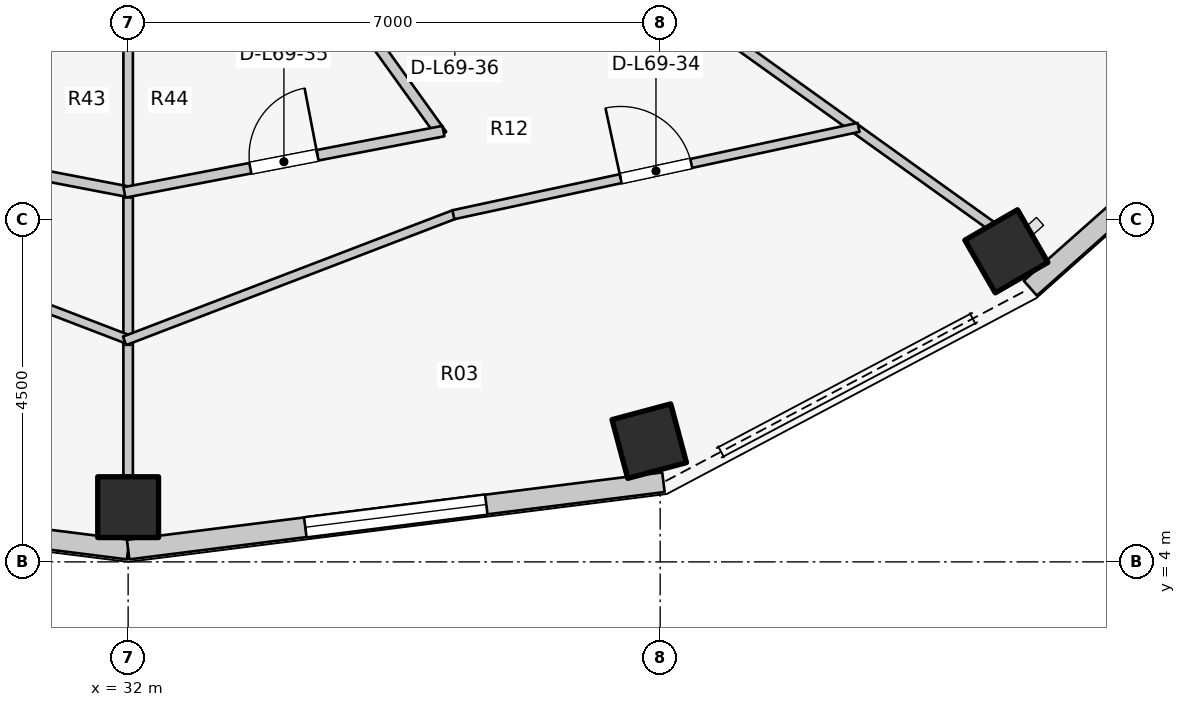
"""IFC4 building model, lengths in metres.
Left out: names, types, materials, properties, quantities, classifications, styles, units other than length and angle.
Written with IfcOpenShell. Run it as: python <this file> out.ifc"""

import sys

from ifc_helpers import new_model, si_unit, direction, frame, frame_2d, origin, origin_2d, place, context, subcontext, project, spatial, rectangle, extrude, element, fill, save


model = new_model("IFC4")
c1 = context("Model", 3, precision=1e-05, world=origin(), true_north=direction((0.0, 1.0)))
c2 = subcontext(c1, "Body", "Model", "MODEL_VIEW")
j1 = project(units=[si_unit("LENGTHUNIT", "METRE"), si_unit("PLANEANGLEUNIT", "RADIAN")], contexts=[c1])
p1 = place(None, origin())
s1 = spatial("IfcSite", under=j1, at=p1, CompositionType="ELEMENT")
p2 = place(p1, origin())
s2 = spatial("IfcBuilding", under=s1, at=p2, CompositionType="ELEMENT")
p3 = place(p2, frame((0.0, 0.0, 226.4)))
s3 = spatial("IfcBuildingStorey", under=s2, at=p3, CompositionType="ELEMENT", Elevation=226.4)
for number, where, z_axis, x_axis in (
    (1, (32.0, 4.72, 0.0), (0.0, 0.0, 1.0), (0.0, -1.0, 0.0)),
    (2, (38.856, 5.589, 0.0), (0.0, 0.0, 1.0), (0.259, -0.966, 0.0)),
    (3, (43.555, 8.086, 0.0), (0.0, 0.0, 1.0), (0.5, -0.866, 0.0)),
):
    element("IfcColumn", number, at=place(p3, frame(where, z_axis=z_axis, x_axis=x_axis)), inside=s3, PredefinedType="COLUMN", context=c2, shape_type="SweptSolid", body=[
        extrude(rectangle(XDim=0.8, YDim=0.8, at=origin_2d()), origin(), (0.0, 0.0, 1.0), 3.1),
    ])
p4 = place(p3, frame((24.957, 5.048, 0.0), z_axis=(0.0, 0.0, 1.0), x_axis=(0.992180211307, -0.124813574142, 0.0)))
e4 = element("IfcWall", 4, at=p4, inside=s3, PredefinedType="STANDARD", context=c2, shape_type="SweptSolid", body=[
    extrude(rectangle(XDim=7.098, YDim=0.26, at=frame_2d((3.549, 0.0))), origin(), (0.0, 0.0, 1.0), 2.85),
])
p5 = place(p4, frame((2.799, 0.0, 0.75)))
e5 = element("IfcOpeningElement", 5, at=p5, cuts=e4, PredefinedType="OPENING", context=c2, shape_type="SweptSolid", body=[
    extrude(rectangle(XDim=1.5, YDim=1.6, at=frame_2d((0.75, 0.8))), frame((0.0, 0.14, 0.0), z_axis=(0.0, -1.0, 0.0), x_axis=(1.0, 0.0, 0.0)), (0.0, 0.0, 1.0), 0.28),
])
p6 = place(p3, frame((32.0, 4.162, 0.0), z_axis=(0.0, 0.0, 1.0), x_axis=(0.992180211307, 0.124813574142, 0.0)))
e6 = element("IfcWall", 6, at=p6, inside=s3, PredefinedType="STANDARD", context=c2, shape_type="SweptSolid", body=[
    extrude(rectangle(XDim=7.098, YDim=0.26, at=frame_2d((3.549, 0.0))), origin(), (0.0, 0.0, 1.0), 2.85),
])
p7 = place(p6, frame((2.349, 0.0, 0.75)))
e7 = element("IfcOpeningElement", 7, at=p7, cuts=e6, PredefinedType="OPENING", context=c2, shape_type="SweptSolid", body=[
    extrude(rectangle(XDim=2.4, YDim=1.7, at=frame_2d((1.2, 0.85))), frame((0.0, 0.14, 0.0), z_axis=(0.0, -1.0, 0.0), x_axis=(1.0, 0.0, 0.0)), (0.0, 0.0, 1.0), 0.28),
])
p8 = place(p3, frame((43.87, 7.601, 0.0), z_axis=(0.0, 0.0, 1.0), x_axis=(0.748165854006, 0.663511759428, 0.0)))
e8 = element("IfcWall", 8, at=p8, inside=s3, PredefinedType="STANDARD", context=c2, shape_type="SweptSolid", body=[
    extrude(rectangle(XDim=4.929, YDim=0.26, at=frame_2d((2.464, 0.0))), origin(), (0.0, 0.0, 1.0), 2.85),
])
p9 = place(p3, frame((32.0, 10.815, 0.0), z_axis=(0.0, 0.0, 1.0), x_axis=(0.0, -1.0, 0.0)))
e9 = element("IfcWall", 9, at=p9, inside=s3, PredefinedType="PARTITIONING", context=c2, shape_type="SweptSolid", body=[
    extrude(rectangle(XDim=5.715, YDim=0.125, at=frame_2d((2.857, 0.0))), origin(), (0.0, 0.0, 1.0), 2.376),
])
p10 = place(p3, frame((37.71, 12.463, 0.0), z_axis=(0.0, 0.0, 1.0), x_axis=(0.813163816543, -0.582034885093, 0.0)))
e10 = element("IfcWall", 10, at=p10, inside=s3, PredefinedType="PARTITIONING", context=c2, shape_type="SweptSolid", body=[
    extrude(rectangle(XDim=6.955, YDim=0.125, at=frame_2d((3.477, 0.0))), origin(), (0.0, 0.0, 1.0), 2.376),
])
p11 = place(p3, frame((27.702, 8.573, 0.0), z_axis=(0.0, 0.0, 1.0), x_axis=(0.933766866443, -0.357881878744, 0.0)))
e11 = element("IfcWall", 11, at=p11, inside=s3, PredefinedType="MOVABLE", context=c2, shape_type="SweptSolid", body=[
    extrude(rectangle(XDim=4.653, YDim=0.12, at=frame_2d((2.327, 0.0))), origin(), (0.0, 0.0, 1.0), 2.376),
])
p12 = place(p11, frame((1.852, 0.0, 0.0)))
e12 = element("IfcOpeningElement", 12, at=p12, cuts=e11, PredefinedType="OPENING", context=c2, shape_type="SweptSolid", body=[
    extrude(rectangle(XDim=0.95, YDim=2.1, at=frame_2d((0.475, 1.05))), frame((0.0, 0.07, 0.0), z_axis=(0.0, -1.0, 0.0), x_axis=(1.0, 0.0, 0.0)), (0.0, 0.0, 1.0), 0.14),
])
p13 = place(p3, frame((27.852, 9.668, 0.0), z_axis=(0.0, 0.0, 1.0), x_axis=(0.98198484664, -0.188959680803, 0.0)))
e13 = element("IfcWall", 13, at=p13, inside=s3, PredefinedType="PLUMBINGWALL", context=c2, shape_type="SweptSolid", body=[
    extrude(rectangle(XDim=4.274, YDim=0.14, at=frame_2d((2.137, 0.0))), origin(), (0.0, 0.0, 1.0), 2.376),
])
p14 = place(p13, frame((1.687, 0.0, 0.0)))
e14 = element("IfcOpeningElement", 14, at=p14, cuts=e13, PredefinedType="OPENING", context=c2, shape_type="SweptSolid", body=[
    extrude(rectangle(XDim=0.9, YDim=2.1, at=frame_2d((0.45, 1.05))), frame((0.0, 0.08, 0.0), z_axis=(0.0, -1.0, 0.0), x_axis=(1.0, 0.0, 0.0)), (0.0, 0.0, 1.0), 0.16),
])
p15 = place(p3, frame((31.953, 6.908, 0.0), z_axis=(0.0, 0.0, 1.0), x_axis=(0.933766866443, 0.357881878744, 0.0)))
e15 = element("IfcWall", 15, at=p15, inside=s3, PredefinedType="MOVABLE", context=c2, shape_type="SweptSolid", body=[
    extrude(rectangle(XDim=4.653, YDim=0.12, at=frame_2d((2.327, 0.0))), origin(), (0.0, 0.0, 1.0), 2.376),
])
p16 = place(p3, frame((36.279, 8.567, 0.0), z_axis=(0.0, 0.0, 1.0), x_axis=(0.977534972695, 0.210773283785, 0.0)))
e16 = element("IfcWall", 16, at=p16, inside=s3, PredefinedType="MOVABLE", context=c2, shape_type="SweptSolid", body=[
    extrude(rectangle(XDim=5.453, YDim=0.12, at=frame_2d((2.727, 0.0))), origin(), (0.0, 0.0, 1.0), 2.376),
])
p17 = place(p16, frame((2.252, 0.0, 0.0)))
e17 = element("IfcOpeningElement", 17, at=p17, cuts=e16, PredefinedType="OPENING", context=c2, shape_type="SweptSolid", body=[
    extrude(rectangle(XDim=0.95, YDim=2.1, at=frame_2d((0.475, 1.05))), frame((0.0, 0.07, 0.0), z_axis=(0.0, -1.0, 0.0), x_axis=(1.0, 0.0, 0.0)), (0.0, 0.0, 1.0), 0.14),
])
p18 = place(p3, frame((34.903, 11.324, 0.0), z_axis=(0.0, 0.0, 1.0), x_axis=(0.583259891741, -0.812285601673, 0.0)))
e18 = element("IfcWall", 18, at=p18, inside=s3, PredefinedType="PLUMBINGWALL", context=c2, shape_type="SweptSolid", body=[
    extrude(rectangle(XDim=2.1, YDim=0.14, at=frame_2d((1.05, 0.0))), origin(), (0.0, 0.0, 1.0), 2.385),
])
p19 = place(p3, frame((31.951, 8.861, 0.0), z_axis=(0.0, 0.0, 1.0), x_axis=(0.98198484664, 0.188959680803, 0.0)))
e19 = element("IfcWall", 19, at=p19, inside=s3, PredefinedType="PLUMBINGWALL", context=c2, shape_type="SweptSolid", body=[
    extrude(rectangle(XDim=4.274, YDim=0.14, at=frame_2d((2.137, 0.0))), origin(), (0.0, 0.0, 1.0), 2.376),
])
p20 = place(p19, frame((1.687, 0.0, 0.0)))
e20 = element("IfcOpeningElement", 20, at=p20, cuts=e19, PredefinedType="OPENING", context=c2, shape_type="SweptSolid", body=[
    extrude(rectangle(XDim=0.9, YDim=2.1, at=frame_2d((0.45, 1.05))), frame((0.0, 0.08, 0.0), z_axis=(0.0, -1.0, 0.0), x_axis=(1.0, 0.0, 0.0)), (0.0, 0.0, 1.0), 0.16),
])
p21 = place(p7, origin())
e21 = element("IfcWindow", 21, at=p21, inside=s3, PartitioningType="SINGLE_PANEL", PredefinedType="WINDOW", context=c2, shape_type="SweptSolid", body=[
    extrude(rectangle(XDim=2.4, YDim=1.7, at=frame_2d((1.2, 0.85))), frame((0.0, 0.03, 0.0), z_axis=(0.0, -1.0, 0.0), x_axis=(1.0, 0.0, 0.0)), (0.0, 0.0, 1.0), 0.06),
])
fill(e7, e21)
p22 = place(p17, origin())
e22 = element("IfcDoor", 22, at=p22, inside=s3, OperationType="SINGLE_SWING_LEFT", PredefinedType="DOOR", context=c2, shape_type="SweptSolid", body=[
    extrude(rectangle(XDim=0.95, YDim=2.1, at=frame_2d((0.475, 1.05))), frame((0.0, 0.025, 0.0), z_axis=(0.0, -1.0, 0.0), x_axis=(1.0, 0.0, 0.0)), (0.0, 0.0, 1.0), 0.05),
])
fill(e17, e22)
p23 = place(p20, origin())
e23 = element("IfcDoor", 23, at=p23, inside=s3, OperationType="SINGLE_SWING_RIGHT", PredefinedType="DOOR", context=c2, shape_type="SweptSolid", body=[
    extrude(rectangle(XDim=0.9, YDim=2.1, at=frame_2d((0.45, 1.05))), frame((0.0, 0.025, 0.0), z_axis=(0.0, -1.0, 0.0), x_axis=(1.0, 0.0, 0.0)), (0.0, 0.0, 1.0), 0.05),
])
fill(e20, e23)
save(model, sys.argv[1])
